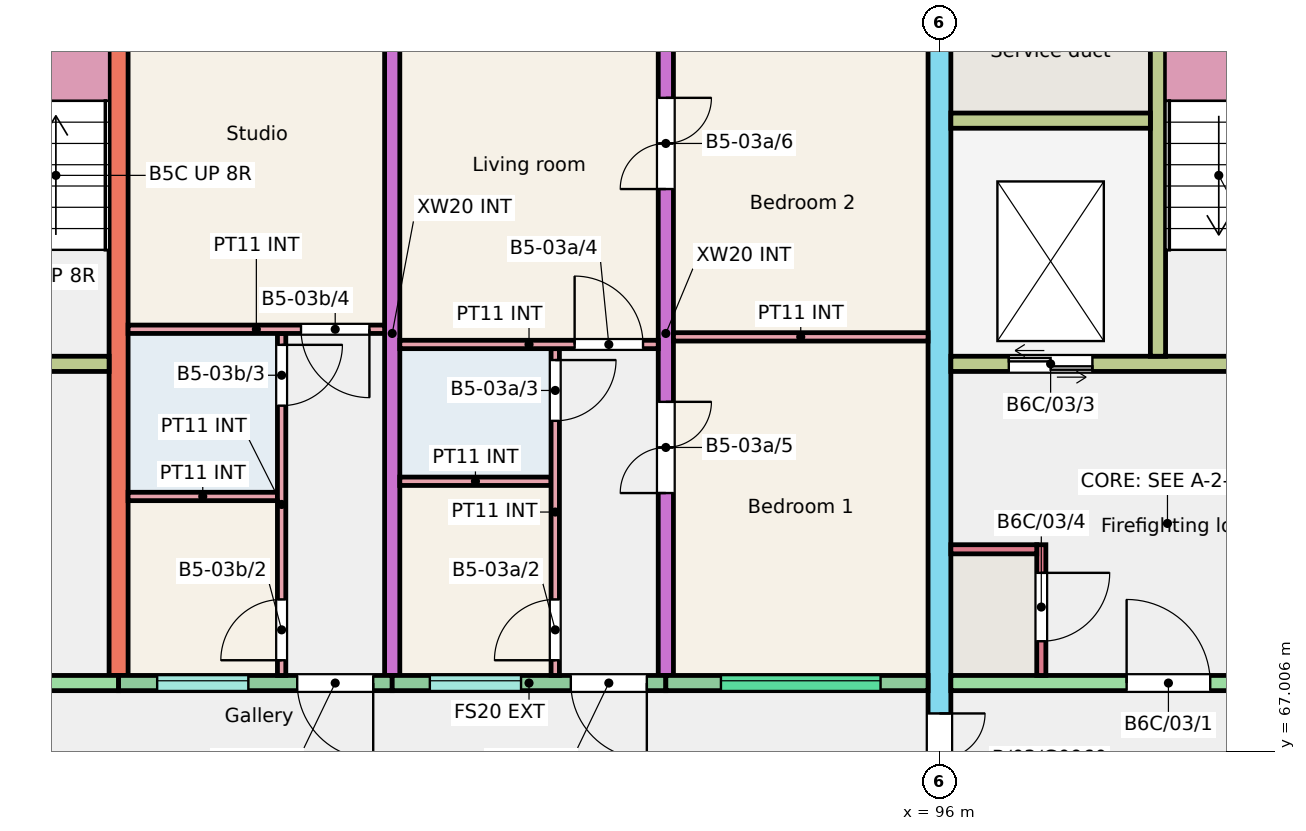
"""IFC4 building model, lengths in metres.
Left out: names, types, materials, properties, quantities, classifications, styles, units other than length and angle.
Written with IfcOpenShell. Run it as: python <this file> out.ifc"""

import sys

from ifc_helpers import new_model, si_unit, direction, frame, frame_2d, origin, place, context, subcontext, project, spatial, rectangle, extrude, element, fill, save


model = new_model("IFC4")
c1 = context("Model", 3, precision=1e-05, world=origin(), true_north=direction((0.0, 1.0)))
c2 = subcontext(c1, "Body", "Model", "MODEL_VIEW")
j1 = project(units=[si_unit("LENGTHUNIT", "METRE"), si_unit("PLANEANGLEUNIT", "RADIAN")], contexts=[c1])
p1 = place(None, origin())
s1 = spatial("IfcSite", under=j1, at=p1, CompositionType="ELEMENT")
p2 = place(p1, origin())
s2 = spatial("IfcBuilding", under=s1, at=p2, CompositionType="ELEMENT")
p3 = place(p2, frame((0.0, 0.0, 9.0)))
s3 = spatial("IfcBuildingStorey", under=s2, at=p3, CompositionType="ELEMENT", Elevation=9.0)
p4 = place(p3, frame((85.2, 68.0, 0.0), z_axis=(0.0, 0.0, 1.0), x_axis=(0.0, 1.0, 0.0)))
e1 = element("IfcWall", 1, at=p4, inside=s3, PredefinedType="SHEAR", context=c2, shape_type="SweptSolid", body=[
    extrude(rectangle(XDim=9.0, YDim=0.25, at=frame_2d((4.5, 0.0))), origin(), (0.0, 0.0, 1.0), 3.0),
])
p5 = place(p3, frame((88.8, 68.0, 0.0), z_axis=(0.0, 0.0, 1.0), x_axis=(0.0, 1.0, 0.0)))
e2 = element("IfcWall", 2, at=p5, inside=s3, PredefinedType="SHEAR", context=c2, shape_type="SweptSolid", body=[
    extrude(rectangle(XDim=9.0, YDim=0.2, at=frame_2d((4.5, 0.0))), origin(), (0.0, 0.0, 1.0), 3.0),
])
p6 = place(p3, frame((92.4, 68.0, 0.0), z_axis=(0.0, 0.0, 1.0), x_axis=(0.0, 1.0, 0.0)))
e3 = element("IfcWall", 3, at=p6, inside=s3, PredefinedType="SHEAR", context=c2, shape_type="SweptSolid", body=[
    extrude(rectangle(XDim=9.0, YDim=0.2, at=frame_2d((4.5, 0.0))), origin(), (0.0, 0.0, 1.0), 3.0),
])
p7 = place(p6, frame((2.4, 0.0, 0.0)))
e4 = element("IfcOpeningElement", 4, at=p7, cuts=e3, PredefinedType="OPENING", context=c2, shape_type="SweptSolid", body=[
    extrude(rectangle(XDim=1.2, YDim=2.1, at=frame_2d((0.6, 1.05))), frame((0.0, 0.11, 0.0), z_axis=(0.0, -1.0, 0.0), x_axis=(1.0, 0.0, 0.0)), (0.0, 0.0, 1.0), 0.22),
])
p8 = place(p6, frame((6.4, 0.0, 0.0)))
e5 = element("IfcOpeningElement", 5, at=p8, cuts=e3, PredefinedType="OPENING", context=c2, shape_type="SweptSolid", body=[
    extrude(rectangle(XDim=1.2, YDim=2.1, at=frame_2d((0.6, 1.05))), frame((0.0, 0.11, 0.0), z_axis=(0.0, -1.0, 0.0), x_axis=(1.0, 0.0, 0.0)), (0.0, 0.0, 1.0), 0.22),
])
p9 = place(p3, frame((96.0, 66.0, 0.0), z_axis=(0.0, 0.0, 1.0), x_axis=(0.0, 1.0, 0.0)))
e6 = element("IfcWall", 6, at=p9, inside=s3, PredefinedType="SHEAR", context=c2, shape_type="SweptSolid", body=[
    extrude(rectangle(XDim=11.0, YDim=0.3, at=frame_2d((5.5, 0.0))), origin(), (0.0, 0.0, 1.0), 3.0),
])
p10 = place(p9, frame((0.3, 0.0, 0.0)))
e7 = element("IfcOpeningElement", 7, at=p10, cuts=e6, PredefinedType="OPENING", context=c2, shape_type="SweptSolid", body=[
    extrude(rectangle(XDim=1.2, YDim=2.1, at=frame_2d((0.6, 1.05))), frame((0.0, 0.16, 0.0), z_axis=(0.0, -1.0, 0.0), x_axis=(1.0, 0.0, 0.0)), (0.0, 0.0, 1.0), 0.32),
])
p11 = place(p3, frame((79.35, 67.9, 0.0), z_axis=(0.0, 0.0, 1.0), x_axis=(1.0, 0.0, 0.0)))
e8 = element("IfcWall", 8, at=p11, inside=s3, PredefinedType="SHEAR", context=c2, shape_type="SweptSolid", body=[
    extrude(rectangle(XDim=5.85, YDim=0.2, at=frame_2d((2.925, 0.0))), origin(), (0.0, 0.0, 1.0), 3.0),
])
p12 = place(p11, frame((2.312, 0.0, 0.0)))
e9 = element("IfcOpeningElement", 9, at=p12, cuts=e8, PredefinedType="OPENING", context=c2, shape_type="SweptSolid", body=[
    extrude(rectangle(XDim=1.1, YDim=2.1, at=frame_2d((0.55, 1.05))), frame((0.0, 0.11, 0.0), z_axis=(0.0, -1.0, 0.0), x_axis=(1.0, 0.0, 0.0)), (0.0, 0.0, 1.0), 0.22),
])
p13 = place(p3, frame((79.35, 72.1, 0.0), z_axis=(0.0, 0.0, 1.0), x_axis=(1.0, 0.0, 0.0)))
e10 = element("IfcWall", 10, at=p13, inside=s3, PredefinedType="SHEAR", context=c2, shape_type="SweptSolid", body=[
    extrude(rectangle(XDim=5.725, YDim=0.2, at=frame_2d((2.862, 0.0))), origin(), (0.0, 0.0, 1.0), 3.0),
])
p14 = place(p13, frame((3.775, 0.0, 0.0)))
e11 = element("IfcOpeningElement", 11, at=p14, cuts=e10, PredefinedType="OPENING", context=c2, shape_type="SweptSolid", body=[
    extrude(rectangle(XDim=1.0, YDim=2.1, at=frame_2d((0.5, 1.05))), frame((0.0, 0.11, 0.0), z_axis=(0.0, -1.0, 0.0), x_axis=(1.0, 0.0, 0.0)), (0.0, 0.0, 1.0), 0.22),
])
p15 = place(p13, frame((0.762, 0.0, 0.0)))
e12 = element("IfcOpeningElement", 12, at=p15, cuts=e10, PredefinedType="OPENING", context=c2, shape_type="SweptSolid", body=[
    extrude(rectangle(XDim=1.1, YDim=2.1, at=frame_2d((0.55, 1.05))), frame((0.0, 0.11, 0.0), z_axis=(0.0, -1.0, 0.0), x_axis=(1.0, 0.0, 0.0)), (0.0, 0.0, 1.0), 0.22),
])
p16 = place(p3, frame((85.2, 67.9, 0.0), z_axis=(0.0, 0.0, 1.0), x_axis=(1.0, 0.0, 0.0)))
e13 = element("IfcWall", 13, at=p16, inside=s3, PredefinedType="SOLIDWALL", context=c2, shape_type="SweptSolid", body=[
    extrude(rectangle(XDim=3.6, YDim=0.2, at=frame_2d((1.8, 0.0))), origin(), (0.0, 0.0, 1.0), 3.0),
])
p17 = place(p16, frame((0.508, 0.0, 1.1)))
e14 = element("IfcOpeningElement", 14, at=p17, cuts=e13, PredefinedType="OPENING", context=c2, shape_type="SweptSolid", body=[
    extrude(rectangle(XDim=1.2, YDim=1.3, at=frame_2d((0.6, 0.65))), frame((0.0, 0.11, 0.0), z_axis=(0.0, -1.0, 0.0), x_axis=(1.0, 0.0, 0.0)), (0.0, 0.0, 1.0), 0.22),
])
p18 = place(p16, frame((2.35, 0.0, 0.0)))
e15 = element("IfcOpeningElement", 15, at=p18, cuts=e13, PredefinedType="OPENING", context=c2, shape_type="SweptSolid", body=[
    extrude(rectangle(XDim=1.0, YDim=2.1, at=frame_2d((0.5, 1.05))), frame((0.0, 0.11, 0.0), z_axis=(0.0, -1.0, 0.0), x_axis=(1.0, 0.0, 0.0)), (0.0, 0.0, 1.0), 0.22),
])
p19 = place(p3, frame((88.8, 67.9, 0.0), z_axis=(0.0, 0.0, 1.0), x_axis=(1.0, 0.0, 0.0)))
e16 = element("IfcWall", 16, at=p19, inside=s3, PredefinedType="SOLIDWALL", context=c2, shape_type="SweptSolid", body=[
    extrude(rectangle(XDim=3.6, YDim=0.2, at=frame_2d((1.8, 0.0))), origin(), (0.0, 0.0, 1.0), 3.0),
])
p20 = place(p19, frame((0.495, 0.0, 1.1)))
e17 = element("IfcOpeningElement", 17, at=p20, cuts=e16, PredefinedType="OPENING", context=c2, shape_type="SweptSolid", body=[
    extrude(rectangle(XDim=1.2, YDim=1.3, at=frame_2d((0.6, 0.65))), frame((0.0, 0.11, 0.0), z_axis=(0.0, -1.0, 0.0), x_axis=(1.0, 0.0, 0.0)), (0.0, 0.0, 1.0), 0.22),
])
p21 = place(p19, frame((2.35, 0.0, 0.0)))
e18 = element("IfcOpeningElement", 18, at=p21, cuts=e16, PredefinedType="OPENING", context=c2, shape_type="SweptSolid", body=[
    extrude(rectangle(XDim=1.0, YDim=2.1, at=frame_2d((0.5, 1.05))), frame((0.0, 0.11, 0.0), z_axis=(0.0, -1.0, 0.0), x_axis=(1.0, 0.0, 0.0)), (0.0, 0.0, 1.0), 0.22),
])
p22 = place(p3, frame((92.4, 67.9, 0.0), z_axis=(0.0, 0.0, 1.0), x_axis=(1.0, 0.0, 0.0)))
e19 = element("IfcWall", 19, at=p22, inside=s3, PredefinedType="SOLIDWALL", context=c2, shape_type="SweptSolid", body=[
    extrude(rectangle(XDim=3.45, YDim=0.2, at=frame_2d((1.725, 0.0))), origin(), (0.0, 0.0, 1.0), 3.0),
])
p23 = place(p22, frame((0.725, 0.0, 1.2)))
e20 = element("IfcOpeningElement", 20, at=p23, cuts=e19, PredefinedType="OPENING", context=c2, shape_type="SweptSolid", body=[
    extrude(rectangle(XDim=2.1, YDim=1.2, at=frame_2d((1.05, 0.6))), frame((0.0, 0.11, 0.0), z_axis=(0.0, -1.0, 0.0), x_axis=(1.0, 0.0, 0.0)), (0.0, 0.0, 1.0), 0.22),
])
p24 = place(p3, frame((96.15, 67.9, 0.0), z_axis=(0.0, 0.0, 1.0), x_axis=(1.0, 0.0, 0.0)))
e21 = element("IfcWall", 21, at=p24, inside=s3, PredefinedType="SHEAR", context=c2, shape_type="SweptSolid", body=[
    extrude(rectangle(XDim=5.85, YDim=0.2, at=frame_2d((2.925, 0.0))), origin(), (0.0, 0.0, 1.0), 3.0),
])
p25 = place(p24, frame((2.312, 0.0, 0.0)))
e22 = element("IfcOpeningElement", 22, at=p25, cuts=e21, PredefinedType="OPENING", context=c2, shape_type="SweptSolid", body=[
    extrude(rectangle(XDim=1.1, YDim=2.1, at=frame_2d((0.55, 1.05))), frame((0.0, 0.11, 0.0), z_axis=(0.0, -1.0, 0.0), x_axis=(1.0, 0.0, 0.0)), (0.0, 0.0, 1.0), 0.22),
])
p26 = place(p3, frame((96.15, 72.1, 0.0), z_axis=(0.0, 0.0, 1.0), x_axis=(1.0, 0.0, 0.0)))
e23 = element("IfcWall", 23, at=p26, inside=s3, PredefinedType="SHEAR", context=c2, shape_type="SweptSolid", body=[
    extrude(rectangle(XDim=5.725, YDim=0.2, at=frame_2d((2.863, 0.0))), origin(), (0.0, 0.0, 1.0), 3.0),
])
p27 = place(p26, frame((3.775, 0.0, 0.0)))
e24 = element("IfcOpeningElement", 24, at=p27, cuts=e23, PredefinedType="OPENING", context=c2, shape_type="SweptSolid", body=[
    extrude(rectangle(XDim=1.0, YDim=2.1, at=frame_2d((0.5, 1.05))), frame((0.0, 0.11, 0.0), z_axis=(0.0, -1.0, 0.0), x_axis=(1.0, 0.0, 0.0)), (0.0, 0.0, 1.0), 0.22),
])
p28 = place(p26, frame((0.762, 0.0, 0.0)))
e25 = element("IfcOpeningElement", 25, at=p28, cuts=e23, PredefinedType="OPENING", context=c2, shape_type="SweptSolid", body=[
    extrude(rectangle(XDim=1.1, YDim=2.1, at=frame_2d((0.55, 1.05))), frame((0.0, 0.11, 0.0), z_axis=(0.0, -1.0, 0.0), x_axis=(1.0, 0.0, 0.0)), (0.0, 0.0, 1.0), 0.22),
])
p29 = place(p3, frame((98.875, 72.2, 0.0), z_axis=(0.0, 0.0, 1.0), x_axis=(0.0, 1.0, 0.0)))
e26 = element("IfcWall", 26, at=p29, inside=s3, PredefinedType="SHEAR", context=c2, shape_type="SweptSolid", body=[
    extrude(rectangle(XDim=4.8, YDim=0.2, at=frame_2d((2.4, 0.0))), origin(), (0.0, 0.0, 1.0), 3.0),
])
p30 = place(p3, frame((96.15, 75.3, 0.0), z_axis=(0.0, 0.0, 1.0), x_axis=(1.0, 0.0, 0.0)))
e27 = element("IfcWall", 27, at=p30, inside=s3, PredefinedType="SHEAR", context=c2, shape_type="SweptSolid", body=[
    extrude(rectangle(XDim=2.625, YDim=0.2, at=frame_2d((1.312, 0.0))), origin(), (0.0, 0.0, 1.0), 3.0),
])
p31 = place(p3, frame((97.34, 68.0, 0.0), z_axis=(0.0, 0.0, 1.0), x_axis=(0.0, 1.0, 0.0)))
e28 = element("IfcWall", 28, at=p31, inside=s3, PredefinedType="SHEAR", context=c2, shape_type="SweptSolid", body=[
    extrude(rectangle(XDim=1.72, YDim=0.12, at=frame_2d((0.86, 0.0))), origin(), (0.0, 0.0, 1.0), 3.0),
])
p32 = place(p31, frame((0.45, 0.0, 0.0)))
e29 = element("IfcOpeningElement", 29, at=p32, cuts=e28, PredefinedType="OPENING", context=c2, shape_type="SweptSolid", body=[
    extrude(rectangle(XDim=0.9, YDim=2.1, at=frame_2d((0.45, 1.05))), frame((0.0, 0.07, 0.0), z_axis=(0.0, -1.0, 0.0), x_axis=(1.0, 0.0, 0.0)), (0.0, 0.0, 1.0), 0.14),
])
p33 = place(p3, frame((96.15, 69.66, 0.0), z_axis=(0.0, 0.0, 1.0), x_axis=(1.0, 0.0, 0.0)))
e30 = element("IfcWall", 30, at=p33, inside=s3, PredefinedType="SHEAR", context=c2, shape_type="SweptSolid", body=[
    extrude(rectangle(XDim=1.13, YDim=0.12, at=frame_2d((0.565, 0.0))), origin(), (0.0, 0.0, 1.0), 3.0),
])
p34 = place(p3, frame((88.9, 70.555, 0.0), z_axis=(0.0, 0.0, 1.0), x_axis=(1.0, 0.0, 0.0)))
e31 = element("IfcWall", 31, at=p34, inside=s3, PredefinedType="PARTITIONING", context=c2, shape_type="SweptSolid", body=[
    extrude(rectangle(XDim=1.99, YDim=0.11, at=frame_2d((0.995, 0.0))), origin(), (0.0, 0.0, 1.0), 2.8),
])
p35 = place(p3, frame((90.945, 68.0, 0.0), z_axis=(0.0, 0.0, 1.0), x_axis=(0.0, 1.0, 0.0)))
e32 = element("IfcWall", 32, at=p35, inside=s3, PredefinedType="PARTITIONING", context=c2, shape_type="SweptSolid", body=[
    extrude(rectangle(XDim=4.3, YDim=0.11, at=frame_2d((2.15, 0.0))), origin(), (0.0, 0.0, 1.0), 2.8),
])
p36 = place(p35, frame((0.2, 0.0, 0.0)))
e33 = element("IfcOpeningElement", 33, at=p36, cuts=e32, PredefinedType="OPENING", context=c2, shape_type="SweptSolid", body=[
    extrude(rectangle(XDim=0.8, YDim=2.1, at=frame_2d((0.4, 1.05))), frame((0.0, 0.065, 0.0), z_axis=(0.0, -1.0, 0.0), x_axis=(1.0, 0.0, 0.0)), (0.0, 0.0, 1.0), 0.13),
])
p37 = place(p35, frame((3.35, 0.0, 0.0)))
e34 = element("IfcOpeningElement", 34, at=p37, cuts=e32, PredefinedType="OPENING", context=c2, shape_type="SweptSolid", body=[
    extrude(rectangle(XDim=0.8, YDim=2.1, at=frame_2d((0.4, 1.05))), frame((0.0, 0.065, 0.0), z_axis=(0.0, -1.0, 0.0), x_axis=(1.0, 0.0, 0.0)), (0.0, 0.0, 1.0), 0.13),
])
p38 = place(p3, frame((88.9, 72.355, 0.0), z_axis=(0.0, 0.0, 1.0), x_axis=(1.0, 0.0, 0.0)))
e35 = element("IfcWall", 35, at=p38, inside=s3, PredefinedType="PARTITIONING", context=c2, shape_type="SweptSolid", body=[
    extrude(rectangle(XDim=3.4, YDim=0.11, at=frame_2d((1.7, 0.0))), origin(), (0.0, 0.0, 1.0), 2.8),
])
p39 = place(p38, frame((2.3, 0.0, 0.0)))
e36 = element("IfcOpeningElement", 36, at=p39, cuts=e35, PredefinedType="OPENING", context=c2, shape_type="SweptSolid", body=[
    extrude(rectangle(XDim=0.9, YDim=2.1, at=frame_2d((0.45, 1.05))), frame((0.0, 0.065, 0.0), z_axis=(0.0, -1.0, 0.0), x_axis=(1.0, 0.0, 0.0)), (0.0, 0.0, 1.0), 0.13),
])
p40 = place(p3, frame((92.5, 72.455, 0.0), z_axis=(0.0, 0.0, 1.0), x_axis=(1.0, 0.0, 0.0)))
e37 = element("IfcWall", 37, at=p40, inside=s3, PredefinedType="PARTITIONING", context=c2, shape_type="SweptSolid", body=[
    extrude(rectangle(XDim=3.35, YDim=0.11, at=frame_2d((1.675, 0.0))), origin(), (0.0, 0.0, 1.0), 2.8),
])
p41 = place(p3, frame((85.325, 70.355, 0.0), z_axis=(0.0, 0.0, 1.0), x_axis=(1.0, 0.0, 0.0)))
e38 = element("IfcWall", 38, at=p41, inside=s3, PredefinedType="PARTITIONING", context=c2, shape_type="SweptSolid", body=[
    extrude(rectangle(XDim=1.965, YDim=0.11, at=frame_2d((0.982, 0.0))), origin(), (0.0, 0.0, 1.0), 2.8),
])
p42 = place(p3, frame((87.345, 68.0, 0.0), z_axis=(0.0, 0.0, 1.0), x_axis=(0.0, 1.0, 0.0)))
e39 = element("IfcWall", 39, at=p42, inside=s3, PredefinedType="PARTITIONING", context=c2, shape_type="SweptSolid", body=[
    extrude(rectangle(XDim=4.5, YDim=0.11, at=frame_2d((2.25, 0.0))), origin(), (0.0, 0.0, 1.0), 2.8),
])
p43 = place(p42, frame((0.2, 0.0, 0.0)))
e40 = element("IfcOpeningElement", 40, at=p43, cuts=e39, PredefinedType="OPENING", context=c2, shape_type="SweptSolid", body=[
    extrude(rectangle(XDim=0.8, YDim=2.1, at=frame_2d((0.4, 1.05))), frame((0.0, 0.065, 0.0), z_axis=(0.0, -1.0, 0.0), x_axis=(1.0, 0.0, 0.0)), (0.0, 0.0, 1.0), 0.13),
])
p44 = place(p42, frame((3.55, 0.0, 0.0)))
e41 = element("IfcOpeningElement", 41, at=p44, cuts=e39, PredefinedType="OPENING", context=c2, shape_type="SweptSolid", body=[
    extrude(rectangle(XDim=0.8, YDim=2.1, at=frame_2d((0.4, 1.05))), frame((0.0, 0.065, 0.0), z_axis=(0.0, -1.0, 0.0), x_axis=(1.0, 0.0, 0.0)), (0.0, 0.0, 1.0), 0.13),
])
p45 = place(p3, frame((85.325, 72.555, 0.0), z_axis=(0.0, 0.0, 1.0), x_axis=(1.0, 0.0, 0.0)))
e42 = element("IfcWall", 42, at=p45, inside=s3, PredefinedType="PARTITIONING", context=c2, shape_type="SweptSolid", body=[
    extrude(rectangle(XDim=3.375, YDim=0.11, at=frame_2d((1.688, 0.0))), origin(), (0.0, 0.0, 1.0), 2.8),
])
p46 = place(p45, frame((2.275, 0.0, 0.0)))
e43 = element("IfcOpeningElement", 43, at=p46, cuts=e42, PredefinedType="OPENING", context=c2, shape_type="SweptSolid", body=[
    extrude(rectangle(XDim=0.9, YDim=2.1, at=frame_2d((0.45, 1.05))), frame((0.0, 0.065, 0.0), z_axis=(0.0, -1.0, 0.0), x_axis=(1.0, 0.0, 0.0)), (0.0, 0.0, 1.0), 0.13),
])
p47 = place(p23, origin())
e44 = element("IfcWindow", 44, at=p47, inside=s3, PartitioningType="SINGLE_PANEL", PredefinedType="WINDOW", context=c2, shape_type="SweptSolid", body=[
    extrude(rectangle(XDim=2.1, YDim=1.2, at=frame_2d((1.05, 0.6))), frame((0.0, 0.06, 0.0), z_axis=(0.0, -1.0, 0.0), x_axis=(1.0, 0.0, 0.0)), (0.0, 0.0, 1.0), 0.06),
])
fill(e20, e44)
p48 = place(p20, origin())
e45 = element("IfcWindow", 45, at=p48, inside=s3, PartitioningType="SINGLE_PANEL", PredefinedType="WINDOW", context=c2, shape_type="SweptSolid", body=[
    extrude(rectangle(XDim=1.2, YDim=1.3, at=frame_2d((0.6, 0.65))), frame((0.0, 0.06, 0.0), z_axis=(0.0, -1.0, 0.0), x_axis=(1.0, 0.0, 0.0)), (0.0, 0.0, 1.0), 0.06),
])
fill(e17, e45)
p49 = place(p17, origin())
e46 = element("IfcWindow", 46, at=p49, inside=s3, PartitioningType="SINGLE_PANEL", PredefinedType="WINDOW", context=c2, shape_type="SweptSolid", body=[
    extrude(rectangle(XDim=1.2, YDim=1.3, at=frame_2d((0.6, 0.65))), frame((0.0, 0.06, 0.0), z_axis=(0.0, -1.0, 0.0), x_axis=(1.0, 0.0, 0.0)), (0.0, 0.0, 1.0), 0.06),
])
fill(e14, e46)
p50 = place(p21, origin())
e47 = element("IfcDoor", 47, at=p50, inside=s3, OperationType="SINGLE_SWING_RIGHT", PredefinedType="DOOR", context=c2, shape_type="SweptSolid", body=[
    extrude(rectangle(XDim=1.0, YDim=2.1, at=frame_2d((0.5, 1.05))), frame((0.0, 0.025, 0.0), z_axis=(0.0, -1.0, 0.0), x_axis=(1.0, 0.0, 0.0)), (0.0, 0.0, 1.0), 0.05),
])
fill(e18, e47)
p51 = place(p36, origin())
e48 = element("IfcDoor", 48, at=p51, inside=s3, OperationType="SINGLE_SWING_LEFT", PredefinedType="DOOR", context=c2, shape_type="SweptSolid", body=[
    extrude(rectangle(XDim=0.8, YDim=2.1, at=frame_2d((0.4, 1.05))), frame((0.0, 0.025, 0.0), z_axis=(0.0, -1.0, 0.0), x_axis=(1.0, 0.0, 0.0)), (0.0, 0.0, 1.0), 0.05),
])
fill(e33, e48)
p52 = place(p37, origin())
e49 = element("IfcDoor", 49, at=p52, inside=s3, OperationType="SINGLE_SWING_RIGHT", PredefinedType="DOOR", context=c2, shape_type="SweptSolid", body=[
    extrude(rectangle(XDim=0.8, YDim=2.1, at=frame_2d((0.4, 1.05))), frame((0.0, 0.025, 0.0), z_axis=(0.0, -1.0, 0.0), x_axis=(1.0, 0.0, 0.0)), (0.0, 0.0, 1.0), 0.05),
])
fill(e34, e49)
p53 = place(p39, origin())
e50 = element("IfcDoor", 50, at=p53, inside=s3, OperationType="SINGLE_SWING_LEFT", PredefinedType="DOOR", context=c2, shape_type="SweptSolid", body=[
    extrude(rectangle(XDim=0.9, YDim=2.1, at=frame_2d((0.45, 1.05))), frame((0.0, 0.025, 0.0), z_axis=(0.0, -1.0, 0.0), x_axis=(1.0, 0.0, 0.0)), (0.0, 0.0, 1.0), 0.05),
])
fill(e36, e50)
p54 = place(p7, origin())
e51 = element("IfcDoor", 51, at=p54, inside=s3, OperationType="DOUBLE_DOOR_SINGLE_SWING", PredefinedType="DOOR", context=c2, shape_type="SweptSolid", body=[
    extrude(rectangle(XDim=1.2, YDim=2.1, at=frame_2d((0.6, 1.05))), frame((0.0, 0.025, 0.0), z_axis=(0.0, -1.0, 0.0), x_axis=(1.0, 0.0, 0.0)), (0.0, 0.0, 1.0), 0.05),
])
fill(e4, e51)
p55 = place(p8, origin())
e52 = element("IfcDoor", 52, at=p55, inside=s3, OperationType="DOUBLE_DOOR_SINGLE_SWING", PredefinedType="DOOR", context=c2, shape_type="SweptSolid", body=[
    extrude(rectangle(XDim=1.2, YDim=2.1, at=frame_2d((0.6, 1.05))), frame((0.0, 0.025, 0.0), z_axis=(0.0, -1.0, 0.0), x_axis=(1.0, 0.0, 0.0)), (0.0, 0.0, 1.0), 0.05),
])
fill(e5, e52)
p56 = place(p18, origin())
e53 = element("IfcDoor", 53, at=p56, inside=s3, OperationType="SINGLE_SWING_RIGHT", PredefinedType="DOOR", context=c2, shape_type="SweptSolid", body=[
    extrude(rectangle(XDim=1.0, YDim=2.1, at=frame_2d((0.5, 1.05))), frame((0.0, 0.025, 0.0), z_axis=(0.0, -1.0, 0.0), x_axis=(1.0, 0.0, 0.0)), (0.0, 0.0, 1.0), 0.05),
])
fill(e15, e53)
p57 = place(p43, origin())
e54 = element("IfcDoor", 54, at=p57, inside=s3, OperationType="SINGLE_SWING_LEFT", PredefinedType="DOOR", context=c2, shape_type="SweptSolid", body=[
    extrude(rectangle(XDim=0.8, YDim=2.1, at=frame_2d((0.4, 1.05))), frame((0.0, 0.025, 0.0), z_axis=(0.0, -1.0, 0.0), x_axis=(1.0, 0.0, 0.0)), (0.0, 0.0, 1.0), 0.05),
])
fill(e40, e54)
p58 = place(p44, origin())
e55 = element("IfcDoor", 55, at=p58, inside=s3, OperationType="SINGLE_SWING_RIGHT", PredefinedType="DOOR", context=c2, shape_type="SweptSolid", body=[
    extrude(rectangle(XDim=0.8, YDim=2.1, at=frame_2d((0.4, 1.05))), frame((0.0, 0.025, 0.0), z_axis=(0.0, -1.0, 0.0), x_axis=(1.0, 0.0, 0.0)), (0.0, 0.0, 1.0), 0.05),
])
fill(e41, e55)
p59 = place(p46, origin())
e56 = element("IfcDoor", 56, at=p59, inside=s3, OperationType="SINGLE_SWING_RIGHT", PredefinedType="DOOR", context=c2, shape_type="SweptSolid", body=[
    extrude(rectangle(XDim=0.9, YDim=2.1, at=frame_2d((0.45, 1.05))), frame((0.0, 0.025, 0.0), z_axis=(0.0, -1.0, 0.0), x_axis=(1.0, 0.0, 0.0)), (0.0, 0.0, 1.0), 0.05),
])
fill(e43, e56)
p60 = place(p25, origin())
e57 = element("IfcDoor", 57, at=p60, inside=s3, OperationType="SINGLE_SWING_LEFT", PredefinedType="DOOR", context=c2, shape_type="SweptSolid", body=[
    extrude(rectangle(XDim=1.1, YDim=2.1, at=frame_2d((0.55, 1.05))), frame((0.0, 0.025, 0.0), z_axis=(0.0, -1.0, 0.0), x_axis=(1.0, 0.0, 0.0)), (0.0, 0.0, 1.0), 0.05),
])
fill(e22, e57)
p61 = place(p28, origin())
e58 = element("IfcDoor", 58, at=p61, inside=s3, OperationType="DOUBLE_DOOR_SLIDING", PredefinedType="DOOR", context=c2, shape_type="SweptSolid", body=[
    extrude(rectangle(XDim=1.1, YDim=2.1, at=frame_2d((0.55, 1.05))), frame((0.0, 0.025, 0.0), z_axis=(0.0, -1.0, 0.0), x_axis=(1.0, 0.0, 0.0)), (0.0, 0.0, 1.0), 0.05),
])
fill(e25, e58)
p62 = place(p32, origin())
e59 = element("IfcDoor", 59, at=p62, inside=s3, OperationType="SINGLE_SWING_RIGHT", PredefinedType="DOOR", context=c2, shape_type="SweptSolid", body=[
    extrude(rectangle(XDim=0.9, YDim=2.1, at=frame_2d((0.45, 1.05))), frame((0.0, 0.025, 0.0), z_axis=(0.0, -1.0, 0.0), x_axis=(1.0, 0.0, 0.0)), (0.0, 0.0, 1.0), 0.05),
])
fill(e29, e59)
p63 = place(p10, origin())
e60 = element("IfcDoor", 60, at=p63, inside=s3, OperationType="DOUBLE_DOOR_SINGLE_SWING", PredefinedType="DOOR", context=c2, shape_type="SweptSolid", body=[
    extrude(rectangle(XDim=1.2, YDim=2.1, at=frame_2d((0.6, 1.05))), frame((0.0, 0.025, 0.0), z_axis=(0.0, -1.0, 0.0), x_axis=(1.0, 0.0, 0.0)), (0.0, 0.0, 1.0), 0.05),
])
fill(e7, e60)
save(model, sys.argv[1])
